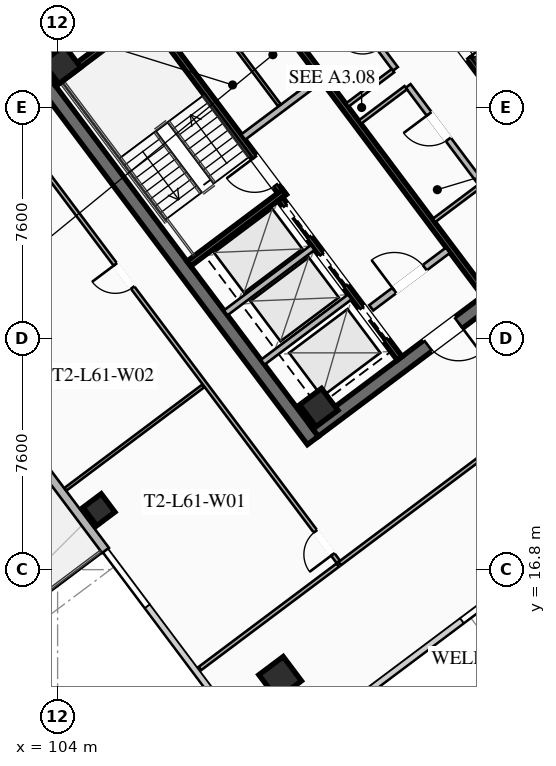
"""IFC4 building model, lengths in metres.
Left out: names, types, materials, properties, quantities, classifications, styles, units other than length and angle.
Written with IfcOpenShell. Run it as: python <this file> out.ifc"""

import sys

from ifc_helpers import new_model, si_unit, direction, frame, frame_2d, origin, origin_2d, place, context, subcontext, project, spatial, rectangle, hollow_rectangle, extrude, element, fill, save


model = new_model("IFC4")
c1 = context("Model", 3, precision=1e-05, world=origin(), true_north=direction((0.0, 1.0)))
c2 = subcontext(c1, "Body", "Model", "MODEL_VIEW")
j1 = project(units=[si_unit("LENGTHUNIT", "METRE"), si_unit("PLANEANGLEUNIT", "RADIAN")], contexts=[c1])
p1 = place(None, origin())
s1 = spatial("IfcSite", under=j1, at=p1, CompositionType="ELEMENT")
p2 = place(p1, origin())
s2 = spatial("IfcBuilding", under=s1, at=p2, CompositionType="ELEMENT")
p3 = place(p2, frame((0.0, 0.0, 225.5)))
s3 = spatial("IfcBuildingStorey", under=s2, at=p3, CompositionType="ELEMENT", Elevation=225.5)
for number, where, z_axis, x_axis in (
    (1, (112.396, 21.047, 0.0), (0.0, 0.0, 1.0), (-0.6, 0.8, 0.0)),
    (2, (115.604, 42.953, 0.0), (0.0, 0.0, 1.0), (0.6, -0.8, 0.0)),
):
    element("IfcWall", number, at=place(p3, frame(where, z_axis=z_axis, x_axis=x_axis)), inside=s3, PredefinedType="SHEAR", context=c2, shape_type="SweptSolid", body=[
        extrude(rectangle(XDim=15.6, YDim=0.45, at=frame_2d((7.8, 0.0))), origin(), (0.0, 0.0, 1.0), 3.55),
    ])
p4 = place(p3, frame((124.649, 30.518, 0.0), z_axis=(0.0, 0.0, 1.0), x_axis=(-0.8, -0.6, 0.0)))
e3 = element("IfcWall", 3, at=p4, inside=s3, PredefinedType="SHEAR", context=c2, shape_type="SweptSolid", body=[
    extrude(rectangle(XDim=15.26, YDim=0.45, at=frame_2d((7.63, 0.0))), origin(), (0.0, 0.0, 1.0), 3.55),
])
p5 = place(p4, frame((9.33, 0.0, 0.0)))
e4 = element("IfcOpeningElement", 4, at=p5, cuts=e3, PredefinedType="OPENING", context=c2, shape_type="SweptSolid", body=[
    extrude(rectangle(XDim=1.25, YDim=2.25, at=frame_2d((0.625, 1.125))), frame((0.0, 0.235, 0.0), z_axis=(0.0, -1.0, 0.0), x_axis=(1.0, 0.0, 0.0)), (0.0, 0.0, 1.0), 0.47),
])
p6 = place(p4, frame((4.28, 0.0, 0.0)))
e5 = element("IfcOpeningElement", 5, at=p6, cuts=e3, PredefinedType="OPENING", context=c2, shape_type="SweptSolid", body=[
    extrude(rectangle(XDim=1.25, YDim=2.25, at=frame_2d((0.625, 1.125))), frame((0.0, 0.235, 0.0), z_axis=(0.0, -1.0, 0.0), x_axis=(1.0, 0.0, 0.0)), (0.0, 0.0, 1.0), 0.47),
])
p7 = place(p3, frame((103.351, 33.482, 0.0), z_axis=(0.0, 0.0, 1.0), x_axis=(0.8, 0.6, 0.0)))
e6 = element("IfcWall", 6, at=p7, inside=s3, PredefinedType="SHEAR", context=c2, shape_type="SweptSolid", body=[
    extrude(rectangle(XDim=15.26, YDim=0.45, at=frame_2d((7.63, 0.0))), origin(), (0.0, 0.0, 1.0), 3.55),
])
p8 = place(p7, frame((4.68, 0.0, 0.0)))
e7 = element("IfcOpeningElement", 7, at=p8, cuts=e6, PredefinedType="OPENING", context=c2, shape_type="SweptSolid", body=[
    extrude(rectangle(XDim=1.25, YDim=2.25, at=frame_2d((0.625, 1.125))), frame((0.0, 0.235, 0.0), z_axis=(0.0, -1.0, 0.0), x_axis=(1.0, 0.0, 0.0)), (0.0, 0.0, 1.0), 0.47),
])
p9 = place(p7, frame((9.73, 0.0, 0.0)))
e8 = element("IfcOpeningElement", 8, at=p9, cuts=e6, PredefinedType="OPENING", context=c2, shape_type="SweptSolid", body=[
    extrude(rectangle(XDim=1.25, YDim=2.25, at=frame_2d((0.625, 1.125))), frame((0.0, 0.235, 0.0), z_axis=(0.0, -1.0, 0.0), x_axis=(1.0, 0.0, 0.0)), (0.0, 0.0, 1.0), 0.47),
])
for number, where, z_axis, x_axis in (
    (9, (112.59, 22.13, 0.0), (0.0, 0.0, 1.0), (0.8, 0.6, 0.0)),
    (10, (104.13, 33.41, 0.0), (0.0, 0.0, 1.0), (0.8, 0.6, 0.0)),
):
    element("IfcColumn", number, at=place(p3, frame(where, z_axis=z_axis, x_axis=x_axis)), inside=s3, PredefinedType="COLUMN", context=c2, shape_type="SweptSolid", body=[
        extrude(hollow_rectangle(XDim=0.9, YDim=0.9, WallThickness=0.04, at=origin_2d()), origin(), (0.0, 0.0, 1.0), 3.37),
    ])
p10 = place(p3, frame((111.32, 13.24, 0.0), z_axis=(0.0, 0.0, 1.0), x_axis=(0.799999996291, 0.600000004945, 0.0)))
e11 = element("IfcColumn", 11, at=p10, inside=s3, PredefinedType="COLUMN", context=c2, shape_type="SweptSolid", body=[
    extrude(hollow_rectangle(XDim=1.0, YDim=1.0, WallThickness=0.04, at=origin_2d()), origin(), (0.0, 0.0, 1.0), 3.37),
])
p11 = place(p3, frame((105.36, 18.77, 0.0), z_axis=(0.0, 0.0, 1.0), x_axis=(0.799999996291, 0.600000004945, 0.0)))
e12 = element("IfcColumn", 12, at=p11, inside=s3, PredefinedType="COLUMN", context=c2, shape_type="SweptSolid", body=[
    extrude(hollow_rectangle(XDim=0.75, YDim=0.75, WallThickness=0.032, at=origin_2d()), origin(), (0.0, 0.0, 1.0), 3.37),
])
p12 = place(p3, frame((105.576, 17.432, 0.0), z_axis=(0.0, 0.0, 1.0), x_axis=(-0.599994081423, 0.800004438899, 0.0)))
e13 = element("IfcWall", 13, at=p12, inside=s3, PredefinedType="SOLIDWALL", context=c2, shape_type="SweptSolid", body=[
    extrude(rectangle(XDim=13.2, YDim=0.28, at=frame_2d((6.6, 0.0))), origin(), (0.0, 0.0, 1.0), 3.37),
])
p13 = place(p12, frame((5.95, 0.0, 0.0)))
e14 = element("IfcOpeningElement", 14, at=p13, cuts=e13, PredefinedType="OPENING", context=c2, shape_type="SweptSolid", body=[
    extrude(rectangle(XDim=1.3, YDim=2.15, at=frame_2d((0.65, 1.075))), frame((0.0, 0.15, 0.0), z_axis=(0.0, -1.0, 0.0), x_axis=(1.0, 0.0, 0.0)), (0.0, 0.0, 1.0), 0.3),
])
p14 = place(p12, frame((3.732, 0.0, 0.85)))
e15 = element("IfcOpeningElement", 15, at=p14, cuts=e13, PredefinedType="OPENING", context=c2, shape_type="SweptSolid", body=[
    extrude(rectangle(XDim=1.8, YDim=1.92, at=frame_2d((0.9, 0.96))), frame((0.0, 0.15, 0.0), z_axis=(0.0, -1.0, 0.0), x_axis=(1.0, 0.0, 0.0)), (0.0, 0.0, 1.0), 0.3),
])
p15 = place(p12, frame((7.668, 0.0, 0.85)))
e16 = element("IfcOpeningElement", 16, at=p15, cuts=e13, PredefinedType="OPENING", context=c2, shape_type="SweptSolid", body=[
    extrude(rectangle(XDim=1.8, YDim=1.92, at=frame_2d((0.9, 0.96))), frame((0.0, 0.15, 0.0), z_axis=(0.0, -1.0, 0.0), x_axis=(1.0, 0.0, 0.0)), (0.0, 0.0, 1.0), 0.3),
])
p16 = place(p3, frame((111.44, 29.08, 0.0), z_axis=(0.0, 0.0, 1.0), x_axis=(-0.59999041401, 0.800007189403, 0.0)))
e17 = element("IfcWall", 17, at=p16, inside=s3, PredefinedType="SHEAR", context=c2, shape_type="SweptSolid", body=[
    extrude(rectangle(XDim=8.15, YDim=0.2, at=frame_2d((4.075, 0.0))), origin(), (0.0, 0.0, 1.0), 3.37),
])
p17 = place(p16, frame((0.45, 0.0, 0.0)))
e18 = element("IfcOpeningElement", 18, at=p17, cuts=e17, PredefinedType="OPENING", context=c2, shape_type="SweptSolid", body=[
    extrude(rectangle(XDim=1.15, YDim=2.2, at=frame_2d((0.575, 1.1))), frame((0.0, 0.11, 0.0), z_axis=(0.0, -1.0, 0.0), x_axis=(1.0, 0.0, 0.0)), (0.0, 0.0, 1.0), 0.22),
])
for number, where, z_axis, x_axis in (
    (19, (108.316, 26.862, 0.0), (0.0, 0.0, 1.0), (0.8, 0.6, 0.0)),
    (20, (103.876, 32.782, 0.0), (0.0, 0.0, 1.0), (0.8, 0.6, 0.0)),
):
    element("IfcWall", number, at=place(p3, frame(where, z_axis=z_axis, x_axis=x_axis)), inside=s3, PredefinedType="SHEAR", context=c2, shape_type="SweptSolid", body=[
        extrude(rectangle(XDim=3.93, YDim=0.2, at=frame_2d((1.965, 0.0))), origin(), (0.0, 0.0, 1.0), 3.37),
    ])
p18 = place(p3, frame((116.56, 34.92, 0.0), z_axis=(0.0, 0.0, 1.0), x_axis=(0.59999041401, -0.800007189403, 0.0)))
e21 = element("IfcWall", 21, at=p18, inside=s3, PredefinedType="SHEAR", context=c2, shape_type="SweptSolid", body=[
    extrude(rectangle(XDim=8.15, YDim=0.2, at=frame_2d((4.075, 0.0))), origin(), (0.0, 0.0, 1.0), 3.37),
])
p19 = place(p18, frame((0.45, 0.0, 0.0)))
e22 = element("IfcOpeningElement", 22, at=p19, cuts=e21, PredefinedType="OPENING", context=c2, shape_type="SweptSolid", body=[
    extrude(rectangle(XDim=1.15, YDim=2.2, at=frame_2d((0.575, 1.1))), frame((0.0, 0.11, 0.0), z_axis=(0.0, -1.0, 0.0), x_axis=(1.0, 0.0, 0.0)), (0.0, 0.0, 1.0), 0.22),
])
p20 = place(p3, frame((118.058, 25.856, 0.0), z_axis=(0.0, 0.0, 1.0), x_axis=(-0.600002657301, 0.799998007018, 0.0)))
e23 = element("IfcWall", 23, at=p20, inside=s3, PredefinedType="SHEAR", context=c2, shape_type="SweptSolid", body=[
    extrude(rectangle(XDim=14.7, YDim=0.2, at=frame_2d((7.35, 0.0))), origin(), (0.0, 0.0, 1.0), 3.37),
])
p21 = place(p3, frame((110.104, 31.028, 0.0), z_axis=(0.0, 0.0, 1.0), x_axis=(0.800018601094, 0.59997519774, 0.0)))
e24 = element("IfcWall", 24, at=p21, inside=s3, PredefinedType="SOLIDWALL", context=c2, shape_type="SweptSolid", body=[
    extrude(rectangle(XDim=3.15, YDim=0.22, at=frame_2d((1.575, 0.0))), origin(), (0.0, 0.0, 1.0), 2.723),
])
p22 = place(p3, frame((114.316, 25.412, 0.0), z_axis=(0.0, 0.0, 1.0), x_axis=(0.800018601094, 0.59997519774, 0.0)))
e25 = element("IfcWall", 25, at=p22, inside=s3, PredefinedType="SOLIDWALL", context=c2, shape_type="SweptSolid", body=[
    extrude(rectangle(XDim=3.15, YDim=0.22, at=frame_2d((1.575, 0.0))), origin(), (0.0, 0.0, 1.0), 2.723),
])
p23 = place(p22, frame((0.95, 0.0, 0.0)))
e26 = element("IfcOpeningElement", 26, at=p23, cuts=e25, PredefinedType="OPENING", context=c2, shape_type="SweptSolid", body=[
    extrude(rectangle(XDim=1.25, YDim=2.25, at=frame_2d((0.625, 1.125))), frame((0.0, 0.12, 0.0), z_axis=(0.0, -1.0, 0.0), x_axis=(1.0, 0.0, 0.0)), (0.0, 0.0, 1.0), 0.24),
])
p24 = place(p3, frame((115.25, 23.75, 0.0), z_axis=(0.0, 0.0, 1.0), x_axis=(-0.599994036198, 0.800004472816, 0.0)))
e27 = element("IfcWall", 27, at=p24, inside=s3, PredefinedType="SHEAR", context=c2, shape_type="SweptSolid", body=[
    extrude(rectangle(XDim=6.55, YDim=0.2, at=frame_2d((3.275, 0.0))), origin(), (0.0, 0.0, 1.0), 3.37),
])
p25 = place(p24, frame((4.975, 0.0, 0.0)))
e28 = element("IfcOpeningElement", 28, at=p25, cuts=e27, PredefinedType="OPENING", context=c2, shape_type="SweptSolid", body=[
    extrude(rectangle(XDim=1.3, YDim=2.25, at=frame_2d((0.65, 1.125))), frame((0.0, 0.11, 0.0), z_axis=(0.0, -1.0, 0.0), x_axis=(1.0, 0.0, 0.0)), (0.0, 0.0, 1.0), 0.22),
])
p26 = place(p24, frame((2.975, 0.0, 0.0)))
e29 = element("IfcOpeningElement", 29, at=p26, cuts=e27, PredefinedType="OPENING", context=c2, shape_type="SweptSolid", body=[
    extrude(rectangle(XDim=1.3, YDim=2.25, at=frame_2d((0.65, 1.125))), frame((0.0, 0.11, 0.0), z_axis=(0.0, -1.0, 0.0), x_axis=(1.0, 0.0, 0.0)), (0.0, 0.0, 1.0), 0.22),
])
p27 = place(p24, frame((0.775, 0.0, 0.0)))
e30 = element("IfcOpeningElement", 30, at=p27, cuts=e27, PredefinedType="OPENING", context=c2, shape_type="SweptSolid", body=[
    extrude(rectangle(XDim=1.3, YDim=2.25, at=frame_2d((0.65, 1.125))), frame((0.0, 0.11, 0.0), z_axis=(0.0, -1.0, 0.0), x_axis=(1.0, 0.0, 0.0)), (0.0, 0.0, 1.0), 0.22),
])
for number, where, z_axis, x_axis in (
    (31, (110.746, 23.622, 0.0), (0.0, 0.0, 1.0), (0.8, 0.6, 0.0)),
    (32, (109.528, 25.246, 0.0), (0.0, 0.0, 1.0), (0.8, 0.6, 0.0)),
):
    element("IfcWall", number, at=place(p3, frame(where, z_axis=z_axis, x_axis=x_axis)), inside=s3, PredefinedType="SOLIDWALL", context=c2, shape_type="SweptSolid", body=[
        extrude(rectangle(XDim=3.58, YDim=0.2, at=frame_2d((1.79, 0.0))), origin(), (0.0, 0.0, 1.0), 3.37),
    ])
p28 = place(p3, frame((111.296, 32.072, 0.0), z_axis=(0.0, 0.0, 1.0), x_axis=(-0.59995887973, 0.800030838552, 0.0)))
e33 = element("IfcWall", 33, at=p28, inside=s3, PredefinedType="PARTITIONING", context=c2, shape_type="SweptSolid", body=[
    extrude(rectangle(XDim=3.8, YDim=0.11, at=frame_2d((1.9, 0.0))), origin(), (0.0, 0.0, 1.0), 2.723),
])
p29 = place(p3, frame((119.73, 27.11, 0.0), z_axis=(0.0, 0.0, 1.0), x_axis=(-0.600005580459, 0.799995814625, 0.0)))
e34 = element("IfcWall", 34, at=p29, inside=s3, PredefinedType="SOLIDWALL", context=c2, shape_type="SweptSolid", body=[
    extrude(rectangle(XDim=7.0, YDim=0.2, at=frame_2d((3.5, 0.0))), origin(), (0.0, 0.0, 1.0), 2.723),
])
p30 = place(p29, frame((0.85, 0.0, 0.0)))
e35 = element("IfcOpeningElement", 35, at=p30, cuts=e34, PredefinedType="OPENING", context=c2, shape_type="SweptSolid", body=[
    extrude(rectangle(XDim=0.95, YDim=2.05, at=frame_2d((0.475, 1.025))), frame((0.0, 0.11, 0.0), z_axis=(0.0, -1.0, 0.0), x_axis=(1.0, 0.0, 0.0)), (0.0, 0.0, 1.0), 0.22),
])
p31 = place(p29, frame((4.8, 0.0, 0.0)))
e36 = element("IfcOpeningElement", 36, at=p31, cuts=e34, PredefinedType="OPENING", context=c2, shape_type="SweptSolid", body=[
    extrude(rectangle(XDim=1.05, YDim=2.2, at=frame_2d((0.525, 1.1))), frame((0.0, 0.11, 0.0), z_axis=(0.0, -1.0, 0.0), x_axis=(1.0, 0.0, 0.0)), (0.0, 0.0, 1.0), 0.22),
])
for number, where, z_axis, x_axis in (
    (37, (113.946, 31.522, 0.0), (0.0, 0.0, 1.0), (0.8, 0.6, 0.0)),
    (38, (116.376, 28.282, 0.0), (0.0, 0.0, 1.0), (0.8, 0.6, 0.0)),
):
    element("IfcWall", number, at=place(p3, frame(where, z_axis=z_axis, x_axis=x_axis)), inside=s3, PredefinedType="PARTITIONING", context=c2, shape_type="SweptSolid", body=[
        extrude(rectangle(XDim=1.88, YDim=0.135, at=frame_2d((0.94, 0.0))), origin(), (0.0, 0.0, 1.0), 2.723),
    ])
p32 = place(p3, frame((115.11, 33.27, 0.0), z_axis=(0.0, 0.0, 1.0), x_axis=(-0.600011160345, 0.79999162962, 0.0)))
e39 = element("IfcWall", 39, at=p32, inside=s3, PredefinedType="SOLIDWALL", context=c2, shape_type="SweptSolid", body=[
    extrude(rectangle(XDim=7.0, YDim=0.2, at=frame_2d((3.5, 0.0))), origin(), (0.0, 0.0, 1.0), 2.723),
])
p33 = place(p32, frame((0.85, 0.0, 0.0)))
e40 = element("IfcOpeningElement", 40, at=p33, cuts=e39, PredefinedType="OPENING", context=c2, shape_type="SweptSolid", body=[
    extrude(rectangle(XDim=0.95, YDim=2.05, at=frame_2d((0.475, 1.025))), frame((0.0, 0.11, 0.0), z_axis=(0.0, -1.0, 0.0), x_axis=(1.0, 0.0, 0.0)), (0.0, 0.0, 1.0), 0.22),
])
p34 = place(p32, frame((4.85, 0.0, 0.0)))
e41 = element("IfcOpeningElement", 41, at=p34, cuts=e39, PredefinedType="OPENING", context=c2, shape_type="SweptSolid", body=[
    extrude(rectangle(XDim=0.95, YDim=2.05, at=frame_2d((0.475, 1.025))), frame((0.0, 0.11, 0.0), z_axis=(0.0, -1.0, 0.0), x_axis=(1.0, 0.0, 0.0)), (0.0, 0.0, 1.0), 0.22),
])
p35 = place(p3, frame((113.526, 32.082, 0.0), z_axis=(0.0, 0.0, 1.0), x_axis=(0.800046745961, 0.599937666993, 0.0)))
e42 = element("IfcWall", 42, at=p35, inside=s3, PredefinedType="PARTITIONING", context=c2, shape_type="SweptSolid", body=[
    extrude(rectangle(XDim=1.88, YDim=0.135, at=frame_2d((0.94, 0.0))), origin(), (0.0, 0.0, 1.0), 2.723),
])
p36 = place(p3, frame((100.756, 33.692, 0.0), z_axis=(0.0, 0.0, 1.0), x_axis=(0.799998716732, 0.60000171102, 0.0)))
e43 = element("IfcWall", 43, at=p36, inside=s3, PredefinedType="PARTITIONING", context=c2, shape_type="SweptSolid", body=[
    extrude(rectangle(XDim=22.83, YDim=0.135, at=frame_2d((11.415, 0.0))), origin(), (0.0, 0.0, 1.0), 2.723),
])
p37 = place(p36, frame((9.193, 0.0, 0.0)))
e44 = element("IfcOpeningElement", 44, at=p37, cuts=e43, PredefinedType="OPENING", context=c2, shape_type="SweptSolid", body=[
    extrude(rectangle(XDim=0.95, YDim=2.05, at=frame_2d((0.475, 1.025))), frame((0.0, 0.077, 0.0), z_axis=(0.0, -1.0, 0.0), x_axis=(1.0, 0.0, 0.0)), (0.0, 0.0, 1.0), 0.155),
])
p38 = place(p36, frame((21.58, 0.0, 0.0)))
e45 = element("IfcOpeningElement", 45, at=p38, cuts=e43, PredefinedType="OPENING", context=c2, shape_type="SweptSolid", body=[
    extrude(rectangle(XDim=0.95, YDim=2.05, at=frame_2d((0.475, 1.025))), frame((0.0, 0.077, 0.0), z_axis=(0.0, -1.0, 0.0), x_axis=(1.0, 0.0, 0.0)), (0.0, 0.0, 1.0), 0.155),
])
p39 = place(p3, frame((124.462, 25.384, 0.0), z_axis=(0.0, 0.0, 1.0), x_axis=(-0.799997904343, -0.6000027942, 0.0)))
e46 = element("IfcWall", 46, at=p39, inside=s3, PredefinedType="PARTITIONING", context=c2, shape_type="SweptSolid", body=[
    extrude(rectangle(XDim=13.98, YDim=0.135, at=frame_2d((6.99, 0.0))), origin(), (0.0, 0.0, 1.0), 2.723),
])
p40 = place(p39, frame((3.635, 0.0, 0.0)))
e47 = element("IfcOpeningElement", 47, at=p40, cuts=e46, PredefinedType="OPENING", context=c2, shape_type="SweptSolid", body=[
    extrude(rectangle(XDim=0.95, YDim=2.05, at=frame_2d((0.475, 1.025))), frame((0.0, 0.077, 0.0), z_axis=(0.0, -1.0, 0.0), x_axis=(1.0, 0.0, 0.0)), (0.0, 0.0, 1.0), 0.155),
])
p41 = place(p3, frame((113.23, 17.06, 0.0), z_axis=(0.0, 0.0, 1.0), x_axis=(-0.600003772342, 0.79999717073, 0.0)))
e48 = element("IfcWall", 48, at=p41, inside=s3, PredefinedType="PARTITIONING", context=c2, shape_type="SweptSolid", body=[
    extrude(rectangle(XDim=20.71, YDim=0.135, at=frame_2d((10.355, 0.0))), origin(), (0.0, 0.0, 1.0), 2.723),
])
p42 = place(p41, frame((0.3, 0.0, 0.0)))
e49 = element("IfcOpeningElement", 49, at=p42, cuts=e48, PredefinedType="OPENING", context=c2, shape_type="SweptSolid", body=[
    extrude(rectangle(XDim=0.95, YDim=2.05, at=frame_2d((0.475, 1.025))), frame((0.0, 0.077, 0.0), z_axis=(0.0, -1.0, 0.0), x_axis=(1.0, 0.0, 0.0)), (0.0, 0.0, 1.0), 0.155),
])
p43 = place(p41, frame((11.272, 0.0, 0.0)))
e50 = element("IfcOpeningElement", 50, at=p43, cuts=e48, PredefinedType="OPENING", context=c2, shape_type="SweptSolid", body=[
    extrude(rectangle(XDim=0.95, YDim=2.05, at=frame_2d((0.475, 1.025))), frame((0.0, 0.077, 0.0), z_axis=(0.0, -1.0, 0.0), x_axis=(1.0, 0.0, 0.0)), (0.0, 0.0, 1.0), 0.155),
])
p44 = place(p41, frame((19.46, 0.0, 0.0)))
e51 = element("IfcOpeningElement", 51, at=p44, cuts=e48, PredefinedType="OPENING", context=c2, shape_type="SweptSolid", body=[
    extrude(rectangle(XDim=0.95, YDim=2.05, at=frame_2d((0.475, 1.025))), frame((0.0, 0.077, 0.0), z_axis=(0.0, -1.0, 0.0), x_axis=(1.0, 0.0, 0.0)), (0.0, 0.0, 1.0), 0.155),
])
p45 = place(p3, frame((108.678, 13.546, 0.0), z_axis=(0.0, 0.0, 1.0), x_axis=(0.8, 0.6, 0.0)))
e52 = element("IfcWall", 52, at=p45, inside=s3, PredefinedType="PARTITIONING", context=c2, shape_type="SweptSolid", body=[
    extrude(rectangle(XDim=5.67, YDim=0.135, at=frame_2d((2.835, 0.0))), origin(), (0.0, 0.0, 1.0), 2.723),
])
p46 = place(p3, frame((104.256, 19.442, 0.0), z_axis=(0.0, 0.0, 1.0), x_axis=(0.799984498661, 0.600020667896, 0.0)))
e53 = element("IfcWall", 53, at=p46, inside=s3, PredefinedType="PARTITIONING", context=c2, shape_type="SweptSolid", body=[
    extrude(rectangle(XDim=5.67, YDim=0.11, at=frame_2d((2.835, 0.0))), origin(), (0.0, 0.0, 1.0), 2.723),
])
p47 = place(p5, origin())
e54 = element("IfcDoor", 54, at=p47, inside=s3, OperationType="SINGLE_SWING_LEFT", PredefinedType="DOOR", context=c2, shape_type="SweptSolid", body=[
    extrude(rectangle(XDim=1.25, YDim=2.25, at=frame_2d((0.625, 1.125))), frame((0.0, 0.025, 0.0), z_axis=(0.0, -1.0, 0.0), x_axis=(1.0, 0.0, 0.0)), (0.0, 0.0, 1.0), 0.05),
])
fill(e4, e54)
p48 = place(p17, origin())
e55 = element("IfcDoor", 55, at=p48, inside=s3, OperationType="SINGLE_SWING_RIGHT", PredefinedType="DOOR", context=c2, shape_type="SweptSolid", body=[
    extrude(rectangle(XDim=1.15, YDim=2.2, at=frame_2d((0.575, 1.1))), frame((0.0, 0.025, 0.0), z_axis=(0.0, -1.0, 0.0), x_axis=(1.0, 0.0, 0.0)), (0.0, 0.0, 1.0), 0.05),
])
fill(e18, e55)
p49 = place(p19, origin())
e56 = element("IfcDoor", 56, at=p49, inside=s3, OperationType="SINGLE_SWING_RIGHT", PredefinedType="DOOR", context=c2, shape_type="SweptSolid", body=[
    extrude(rectangle(XDim=1.15, YDim=2.2, at=frame_2d((0.575, 1.1))), frame((0.0, 0.025, 0.0), z_axis=(0.0, -1.0, 0.0), x_axis=(1.0, 0.0, 0.0)), (0.0, 0.0, 1.0), 0.05),
])
fill(e22, e56)
p50 = place(p23, origin())
e57 = element("IfcDoor", 57, at=p50, inside=s3, OperationType="SINGLE_SWING_LEFT", PredefinedType="DOOR", context=c2, shape_type="SweptSolid", body=[
    extrude(rectangle(XDim=1.25, YDim=2.25, at=frame_2d((0.625, 1.125))), frame((0.0, 0.025, 0.0), z_axis=(0.0, -1.0, 0.0), x_axis=(1.0, 0.0, 0.0)), (0.0, 0.0, 1.0), 0.05),
])
fill(e26, e57)
p51 = place(p31, origin())
e58 = element("IfcDoor", 58, at=p51, inside=s3, OperationType="SINGLE_SWING_RIGHT", PredefinedType="DOOR", context=c2, shape_type="SweptSolid", body=[
    extrude(rectangle(XDim=1.05, YDim=2.2, at=frame_2d((0.525, 1.1))), frame((0.0, 0.025, 0.0), z_axis=(0.0, -1.0, 0.0), x_axis=(1.0, 0.0, 0.0)), (0.0, 0.0, 1.0), 0.05),
])
fill(e36, e58)
p52 = place(p42, origin())
e59 = element("IfcDoor", 59, at=p52, inside=s3, OperationType="SINGLE_SWING_LEFT", PredefinedType="DOOR", context=c2, shape_type="SweptSolid", body=[
    extrude(rectangle(XDim=0.95, YDim=2.05, at=frame_2d((0.475, 1.025))), frame((0.0, 0.025, 0.0), z_axis=(0.0, -1.0, 0.0), x_axis=(1.0, 0.0, 0.0)), (0.0, 0.0, 1.0), 0.05),
])
fill(e49, e59)
p53 = place(p43, origin())
e60 = element("IfcDoor", 60, at=p53, inside=s3, OperationType="SINGLE_SWING_RIGHT", PredefinedType="DOOR", context=c2, shape_type="SweptSolid", body=[
    extrude(rectangle(XDim=0.95, YDim=2.05, at=frame_2d((0.475, 1.025))), frame((0.0, 0.025, 0.0), z_axis=(0.0, -1.0, 0.0), x_axis=(1.0, 0.0, 0.0)), (0.0, 0.0, 1.0), 0.05),
])
fill(e50, e60)
p54 = place(p25, origin())
e61 = element("IfcDoor", 61, at=p54, inside=s3, OperationType="SLIDING_TO_LEFT", PredefinedType="DOOR", context=c2, shape_type="SweptSolid", body=[
    extrude(rectangle(XDim=1.3, YDim=2.25, at=frame_2d((0.65, 1.125))), frame((0.0, 0.025, 0.0), z_axis=(0.0, -1.0, 0.0), x_axis=(1.0, 0.0, 0.0)), (0.0, 0.0, 1.0), 0.05),
])
fill(e28, e61)
p55 = place(p26, origin())
e62 = element("IfcDoor", 62, at=p55, inside=s3, OperationType="SLIDING_TO_LEFT", PredefinedType="DOOR", context=c2, shape_type="SweptSolid", body=[
    extrude(rectangle(XDim=1.3, YDim=2.25, at=frame_2d((0.65, 1.125))), frame((0.0, 0.025, 0.0), z_axis=(0.0, -1.0, 0.0), x_axis=(1.0, 0.0, 0.0)), (0.0, 0.0, 1.0), 0.05),
])
fill(e29, e62)
p56 = place(p27, origin())
e63 = element("IfcDoor", 63, at=p56, inside=s3, OperationType="SLIDING_TO_LEFT", PredefinedType="DOOR", context=c2, shape_type="SweptSolid", body=[
    extrude(rectangle(XDim=1.3, YDim=2.25, at=frame_2d((0.65, 1.125))), frame((0.0, 0.025, 0.0), z_axis=(0.0, -1.0, 0.0), x_axis=(1.0, 0.0, 0.0)), (0.0, 0.0, 1.0), 0.05),
])
fill(e30, e63)
save(model, sys.argv[1])
